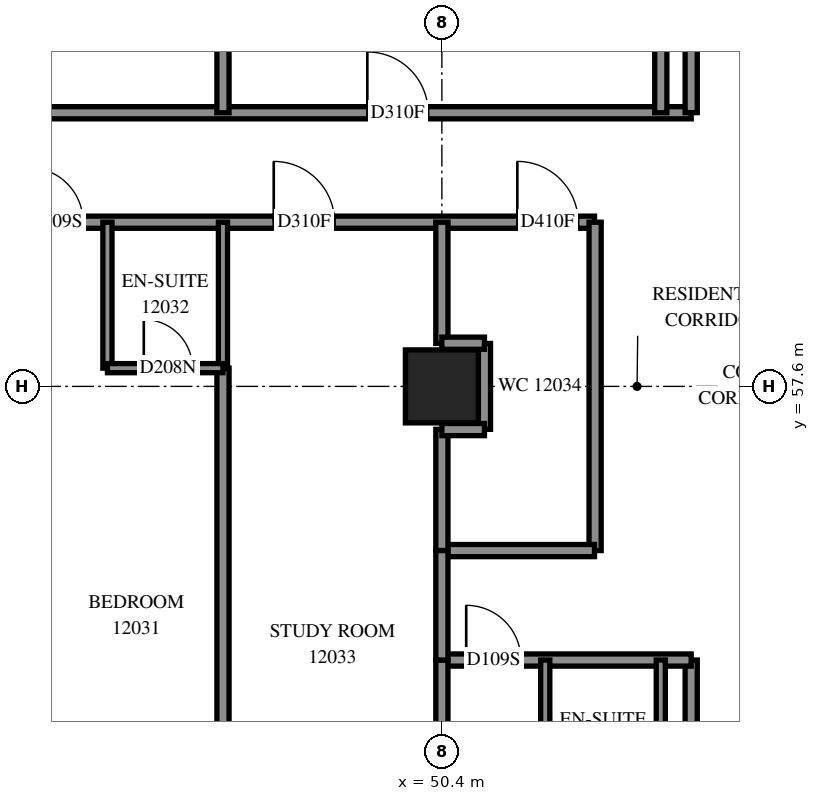
"""IFC4 building model, lengths in metres.
Left out: names, types, materials, properties, quantities, classifications, styles, units other than length and angle.
Written with IfcOpenShell. Run it as: python <this file> out.ifc"""

import sys

from ifc_helpers import new_model, si_unit, direction, frame, frame_2d, origin, origin_2d, place, context, subcontext, project, spatial, rectangle, extrude, element, fill, save


model = new_model("IFC4")
c1 = context("Model", 3, precision=1e-05, world=origin(), true_north=direction((0.0, 1.0)))
c2 = subcontext(c1, "Body", "Model", "MODEL_VIEW")
j1 = project(units=[si_unit("LENGTHUNIT", "METRE"), si_unit("PLANEANGLEUNIT", "RADIAN")], contexts=[c1])
p1 = place(None, origin())
s1 = spatial("IfcSite", under=j1, at=p1, CompositionType="ELEMENT")
p2 = place(p1, origin())
s2 = spatial("IfcBuilding", under=s1, at=p2, CompositionType="ELEMENT")
p3 = place(p2, frame((0.0, 0.0, 47.4)))
s3 = spatial("IfcBuildingStorey", under=s2, at=p3, CompositionType="ELEMENT", Elevation=47.4)
p4 = place(p3, frame((50.4, 57.6, 0.0), z_axis=(0.0, 0.0, 1.0), x_axis=(1.0, 0.0, 0.0)))
e1 = element("IfcColumn", 1, at=p4, inside=s3, PredefinedType="COLUMN", context=c2, shape_type="SweptSolid", body=[
    extrude(rectangle(XDim=1.2, YDim=1.2, at=origin_2d()), origin(), (0.0, 0.0, 1.0), 3.1),
])
p5 = place(p3, frame((28.802, 60.3, 0.0), z_axis=(0.0, 0.0, 1.0), x_axis=(1.0, 0.0, 0.0)))
e2 = element("IfcWall", 2, at=p5, inside=s3, PredefinedType="PARTITIONING", context=c2, shape_type="SweptSolid", body=[
    extrude(rectangle(XDim=24.108, YDim=0.2, at=frame_2d((12.054, 0.0))), origin(), (0.0, 0.0, 1.0), 3.1),
])
p6 = place(p5, frame((11.323, 0.0, 0.0)))
e3 = element("IfcOpeningElement", 3, at=p6, cuts=e2, PredefinedType="OPENING", context=c2, shape_type="SweptSolid", body=[
    extrude(rectangle(XDim=1.0, YDim=2.1, at=frame_2d((0.5, 1.05))), frame((0.0, 0.11, 0.0), z_axis=(0.0, -1.0, 0.0), x_axis=(1.0, 0.0, 0.0)), (0.0, 0.0, 1.0), 0.22),
])
p7 = place(p5, frame((14.798, 0.0, 0.0)))
e4 = element("IfcOpeningElement", 4, at=p7, cuts=e2, PredefinedType="OPENING", context=c2, shape_type="SweptSolid", body=[
    extrude(rectangle(XDim=0.9, YDim=2.1, at=frame_2d((0.45, 1.05))), frame((0.0, 0.11, 0.0), z_axis=(0.0, -1.0, 0.0), x_axis=(1.0, 0.0, 0.0)), (0.0, 0.0, 1.0), 0.22),
])
p8 = place(p5, frame((18.833, 0.0, 0.0)))
e5 = element("IfcOpeningElement", 5, at=p8, cuts=e2, PredefinedType="OPENING", context=c2, shape_type="SweptSolid", body=[
    extrude(rectangle(XDim=1.0, YDim=2.1, at=frame_2d((0.5, 1.05))), frame((0.0, 0.11, 0.0), z_axis=(0.0, -1.0, 0.0), x_axis=(1.0, 0.0, 0.0)), (0.0, 0.0, 1.0), 0.22),
])
p9 = place(p5, frame((22.839, 0.0, 0.0)))
e6 = element("IfcOpeningElement", 6, at=p9, cuts=e2, PredefinedType="OPENING", context=c2, shape_type="SweptSolid", body=[
    extrude(rectangle(XDim=1.0, YDim=2.1, at=frame_2d((0.5, 1.05))), frame((0.0, 0.11, 0.0), z_axis=(0.0, -1.0, 0.0), x_axis=(1.0, 0.0, 0.0)), (0.0, 0.0, 1.0), 0.22),
])
p10 = place(p3, frame((33.3, 62.1, 0.0), z_axis=(0.0, 0.0, 1.0), x_axis=(1.0, 0.0, 0.0)))
e7 = element("IfcWall", 7, at=p10, inside=s3, PredefinedType="PARTITIONING", context=c2, shape_type="SweptSolid", body=[
    extrude(rectangle(XDim=21.2, YDim=0.2, at=frame_2d((10.6, 0.0))), origin(), (0.0, 0.0, 1.0), 3.1),
])
p11 = place(p10, frame((1.395, 0.0, 0.0)))
e8 = element("IfcOpeningElement", 8, at=p11, cuts=e7, PredefinedType="OPENING", context=c2, shape_type="SweptSolid", body=[
    extrude(rectangle(XDim=0.9, YDim=2.1, at=frame_2d((0.45, 1.05))), frame((0.0, 0.11, 0.0), z_axis=(0.0, -1.0, 0.0), x_axis=(1.0, 0.0, 0.0)), (0.0, 0.0, 1.0), 0.22),
])
p12 = place(p10, frame((8.674, 0.0, 0.0)))
e9 = element("IfcOpeningElement", 9, at=p12, cuts=e7, PredefinedType="OPENING", context=c2, shape_type="SweptSolid", body=[
    extrude(rectangle(XDim=1.0, YDim=2.1, at=frame_2d((0.5, 1.05))), frame((0.0, 0.11, 0.0), z_axis=(0.0, -1.0, 0.0), x_axis=(1.0, 0.0, 0.0)), (0.0, 0.0, 1.0), 0.22),
])
p13 = place(p10, frame((15.874, 0.0, 0.0)))
e10 = element("IfcOpeningElement", 10, at=p13, cuts=e7, PredefinedType="OPENING", context=c2, shape_type="SweptSolid", body=[
    extrude(rectangle(XDim=1.0, YDim=2.1, at=frame_2d((0.5, 1.05))), frame((0.0, 0.11, 0.0), z_axis=(0.0, -1.0, 0.0), x_axis=(1.0, 0.0, 0.0)), (0.0, 0.0, 1.0), 0.22),
])
p14 = place(p3, frame((46.8, 62.1, 0.0), z_axis=(0.0, 0.0, 1.0), x_axis=(0.0, 1.0, 0.0)))
e11 = element("IfcWall", 11, at=p14, inside=s3, PredefinedType="PARTITIONING", context=c2, shape_type="SweptSolid", body=[
    extrude(rectangle(XDim=10.656, YDim=0.2, at=frame_2d((5.328, 0.0))), origin(), (0.0, 0.0, 1.0), 3.1),
])
p15 = place(p3, frame((54.0, 62.1, 0.0), z_axis=(0.0, 0.0, 1.0), x_axis=(0.0, 1.0, 0.0)))
e12 = element("IfcWall", 12, at=p15, inside=s3, PredefinedType="PARTITIONING", context=c2, shape_type="SweptSolid", body=[
    extrude(rectangle(XDim=10.605, YDim=0.2, at=frame_2d((5.302, 0.0))), origin(), (0.0, 0.0, 1.0), 3.1),
])
p16 = place(p3, frame((46.8, 49.75, 0.0), z_axis=(0.0, 0.0, 1.0), x_axis=(0.0, 1.0, 0.0)))
e13 = element("IfcWall", 13, at=p16, inside=s3, PredefinedType="PARTITIONING", context=c2, shape_type="SweptSolid", body=[
    extrude(rectangle(XDim=8.15, YDim=0.2, at=frame_2d((4.075, 0.0))), origin(), (0.0, 0.0, 1.0), 3.1),
])
p17 = place(p3, frame((54.5, 47.3, 0.0), z_axis=(0.0, 0.0, 1.0), x_axis=(0.0, 1.0, 0.0)))
e14 = element("IfcWall", 14, at=p17, inside=s3, PredefinedType="PARTITIONING", context=c2, shape_type="SweptSolid", body=[
    extrude(rectangle(XDim=5.8, YDim=0.2, at=frame_2d((2.9, 0.0))), origin(), (0.0, 0.0, 1.0), 3.1),
])
p18 = place(p3, frame((54.5, 62.102, 0.0), z_axis=(0.0, 0.0, 1.0), x_axis=(0.0, 1.0, 0.0)))
e15 = element("IfcWall", 15, at=p18, inside=s3, PredefinedType="PARTITIONING", context=c2, shape_type="SweptSolid", body=[
    extrude(rectangle(XDim=5.798, YDim=0.2, at=frame_2d((2.899, 0.0))), origin(), (0.0, 0.0, 1.0), 3.1),
])
p19 = place(p3, frame((52.92, 54.9, 0.0), z_axis=(0.0, 0.0, 1.0), x_axis=(0.0, 1.0, 0.0)))
e16 = element("IfcWall", 16, at=p19, inside=s3, PredefinedType="PARTITIONING", context=c2, shape_type="SweptSolid", body=[
    extrude(rectangle(XDim=5.4, YDim=0.2, at=frame_2d((2.7, 0.0))), origin(), (0.0, 0.0, 1.0), 3.1),
])
p20 = place(p3, frame((50.4, 53.1, 0.0), z_axis=(0.0, 0.0, 1.0), x_axis=(1.0, 0.0, 0.0)))
e17 = element("IfcWall", 17, at=p20, inside=s3, PredefinedType="PARTITIONING", context=c2, shape_type="SweptSolid", body=[
    extrude(rectangle(XDim=4.1, YDim=0.2, at=frame_2d((2.05, 0.0))), origin(), (0.0, 0.0, 1.0), 3.1),
])
p21 = place(p20, frame((0.4, 0.0, 0.0)))
e18 = element("IfcOpeningElement", 18, at=p21, cuts=e17, PredefinedType="OPENING", context=c2, shape_type="SweptSolid", body=[
    extrude(rectangle(XDim=0.9, YDim=2.1, at=frame_2d((0.45, 1.05))), frame((0.0, 0.11, 0.0), z_axis=(0.0, -1.0, 0.0), x_axis=(1.0, 0.0, 0.0)), (0.0, 0.0, 1.0), 0.22),
])
p22 = place(p3, frame((50.4, 54.9, 0.0), z_axis=(0.0, 0.0, 1.0), x_axis=(1.0, 0.0, 0.0)))
e19 = element("IfcWall", 19, at=p22, inside=s3, PredefinedType="PARTITIONING", context=c2, shape_type="SweptSolid", body=[
    extrude(rectangle(XDim=2.51, YDim=0.2, at=frame_2d((1.255, 0.0))), origin(), (0.0, 0.0, 1.0), 3.1),
])
for number, where, z_axis, x_axis in (
    (20, (44.9, 57.9, 0.0), (0.0, 0.0, 1.0), (0.0, 1.0, 0.0)),
    (21, (46.8, 57.9, 0.0), (0.0, 0.0, 1.0), (0.0, 1.0, 0.0)),
    (22, (52.1, 50.7, 0.0), (0.0, 0.0, 1.0), (0.0, 1.0, 0.0)),
    (23, (54.0, 50.7, 0.0), (0.0, 0.0, 1.0), (0.0, 1.0, 0.0)),
):
    element("IfcWall", number, at=place(p3, frame(where, z_axis=z_axis, x_axis=x_axis)), inside=s3, PredefinedType="PARTITIONING", context=c2, shape_type="SweptSolid", body=[
        extrude(rectangle(XDim=2.4, YDim=0.15, at=frame_2d((1.2, 0.0))), origin(), (0.0, 0.0, 1.0), 3.1),
    ])
p23 = place(p3, frame((50.4, 51.0, 0.0), z_axis=(0.0, 0.0, 1.0), x_axis=(0.0, 1.0, 0.0)))
e24 = element("IfcWall", 24, at=p23, inside=s3, PredefinedType="PARTITIONING", context=c2, shape_type="SweptSolid", body=[
    extrude(rectangle(XDim=2.1, YDim=0.2, at=frame_2d((1.05, 0.0))), origin(), (0.0, 0.0, 1.0), 3.1),
])
for number, where, z_axis, x_axis in (
    (25, (50.4, 54.9, 0.0), (0.0, 0.0, 1.0), (0.0, 1.0, 0.0)),
    (26, (50.4, 58.306, 0.0), (0.0, 0.0, 1.0), (0.0, 1.0, 0.0)),
):
    element("IfcWall", number, at=place(p3, frame(where, z_axis=z_axis, x_axis=x_axis)), inside=s3, PredefinedType="PARTITIONING", context=c2, shape_type="SweptSolid", body=[
        extrude(rectangle(XDim=1.994, YDim=0.2, at=frame_2d((0.997, 0.0))), origin(), (0.0, 0.0, 1.0), 3.1),
    ])
p24 = place(p3, frame((44.9, 57.9, 0.0), z_axis=(0.0, 0.0, 1.0), x_axis=(1.0, 0.0, 0.0)))
e27 = element("IfcWall", 27, at=p24, inside=s3, PredefinedType="PARTITIONING", context=c2, shape_type="SweptSolid", body=[
    extrude(rectangle(XDim=1.9, YDim=0.15, at=frame_2d((0.95, 0.0))), origin(), (0.0, 0.0, 1.0), 3.1),
])
p25 = place(p24, frame((0.598, 0.0, 0.0)))
e28 = element("IfcOpeningElement", 28, at=p25, cuts=e27, PredefinedType="OPENING", context=c2, shape_type="SweptSolid", body=[
    extrude(rectangle(XDim=0.8, YDim=2.1, at=frame_2d((0.4, 1.05))), frame((0.0, 0.085, 0.0), z_axis=(0.0, -1.0, 0.0), x_axis=(1.0, 0.0, 0.0)), (0.0, 0.0, 1.0), 0.17),
])
p26 = place(p3, frame((50.4, 53.1, 0.0), z_axis=(0.0, 0.0, 1.0), x_axis=(0.0, 1.0, 0.0)))
e29 = element("IfcWall", 29, at=p26, inside=s3, PredefinedType="PARTITIONING", context=c2, shape_type="SweptSolid", body=[
    extrude(rectangle(XDim=1.8, YDim=0.2, at=frame_2d((0.9, 0.0))), origin(), (0.0, 0.0, 1.0), 3.1),
])
p27 = place(p3, frame((51.1, 56.894, 0.0), z_axis=(0.0, 0.0, 1.0), x_axis=(0.0, 1.0, 0.0)))
e30 = element("IfcWall", 30, at=p27, inside=s3, PredefinedType="PARTITIONING", context=c2, shape_type="SweptSolid", body=[
    extrude(rectangle(XDim=1.412, YDim=0.2, at=frame_2d((0.706, 0.0))), origin(), (0.0, 0.0, 1.0), 3.1),
])
for number, where, z_axis, x_axis in (
    (31, (50.4, 58.31, 0.0), (0.0, 0.0, 1.0), (1.0, 0.0, 0.0)),
    (32, (50.4, 56.89, 0.0), (0.0, 0.0, 1.0), (1.0, 0.0, 0.0)),
):
    element("IfcWall", number, at=place(p3, frame(where, z_axis=z_axis, x_axis=x_axis)), inside=s3, PredefinedType="PARTITIONING", context=c2, shape_type="SweptSolid", body=[
        extrude(rectangle(XDim=0.7, YDim=0.2, at=frame_2d((0.35, 0.0))), origin(), (0.0, 0.0, 1.0), 3.1),
    ])
p28 = place(p13, origin())
e33 = element("IfcDoor", 33, at=p28, inside=s3, OperationType="SINGLE_SWING_LEFT", PredefinedType="DOOR", context=c2, shape_type="SweptSolid", body=[
    extrude(rectangle(XDim=1.0, YDim=2.1, at=frame_2d((0.5, 1.05))), frame((0.0, 0.025, 0.0), z_axis=(0.0, -1.0, 0.0), x_axis=(1.0, 0.0, 0.0)), (0.0, 0.0, 1.0), 0.05),
])
fill(e10, e33)
p29 = place(p7, origin())
e34 = element("IfcDoor", 34, at=p29, inside=s3, OperationType="SINGLE_SWING_LEFT", PredefinedType="DOOR", context=c2, shape_type="SweptSolid", body=[
    extrude(rectangle(XDim=0.9, YDim=2.1, at=frame_2d((0.45, 1.05))), frame((0.0, 0.025, 0.0), z_axis=(0.0, -1.0, 0.0), x_axis=(1.0, 0.0, 0.0)), (0.0, 0.0, 1.0), 0.05),
])
fill(e4, e34)
p30 = place(p25, origin())
e35 = element("IfcDoor", 35, at=p30, inside=s3, OperationType="SINGLE_SWING_RIGHT", PredefinedType="DOOR", context=c2, shape_type="SweptSolid", body=[
    extrude(rectangle(XDim=0.8, YDim=2.1, at=frame_2d((0.4, 1.05))), frame((0.0, 0.025, 0.0), z_axis=(0.0, -1.0, 0.0), x_axis=(1.0, 0.0, 0.0)), (0.0, 0.0, 1.0), 0.05),
])
fill(e28, e35)
p31 = place(p8, origin())
e36 = element("IfcDoor", 36, at=p31, inside=s3, OperationType="SINGLE_SWING_RIGHT", PredefinedType="DOOR", context=c2, shape_type="SweptSolid", body=[
    extrude(rectangle(XDim=1.0, YDim=2.1, at=frame_2d((0.5, 1.05))), frame((0.0, 0.025, 0.0), z_axis=(0.0, -1.0, 0.0), x_axis=(1.0, 0.0, 0.0)), (0.0, 0.0, 1.0), 0.05),
])
fill(e5, e36)
p32 = place(p9, origin())
e37 = element("IfcDoor", 37, at=p32, inside=s3, OperationType="SINGLE_SWING_LEFT", PredefinedType="DOOR", context=c2, shape_type="SweptSolid", body=[
    extrude(rectangle(XDim=1.0, YDim=2.1, at=frame_2d((0.5, 1.05))), frame((0.0, 0.025, 0.0), z_axis=(0.0, -1.0, 0.0), x_axis=(1.0, 0.0, 0.0)), (0.0, 0.0, 1.0), 0.05),
])
fill(e6, e37)
p33 = place(p21, origin())
e38 = element("IfcDoor", 38, at=p33, inside=s3, OperationType="SINGLE_SWING_LEFT", PredefinedType="DOOR", context=c2, shape_type="SweptSolid", body=[
    extrude(rectangle(XDim=0.9, YDim=2.1, at=frame_2d((0.45, 1.05))), frame((0.0, 0.025, 0.0), z_axis=(0.0, -1.0, 0.0), x_axis=(1.0, 0.0, 0.0)), (0.0, 0.0, 1.0), 0.05),
])
fill(e18, e38)
save(model, sys.argv[1])
